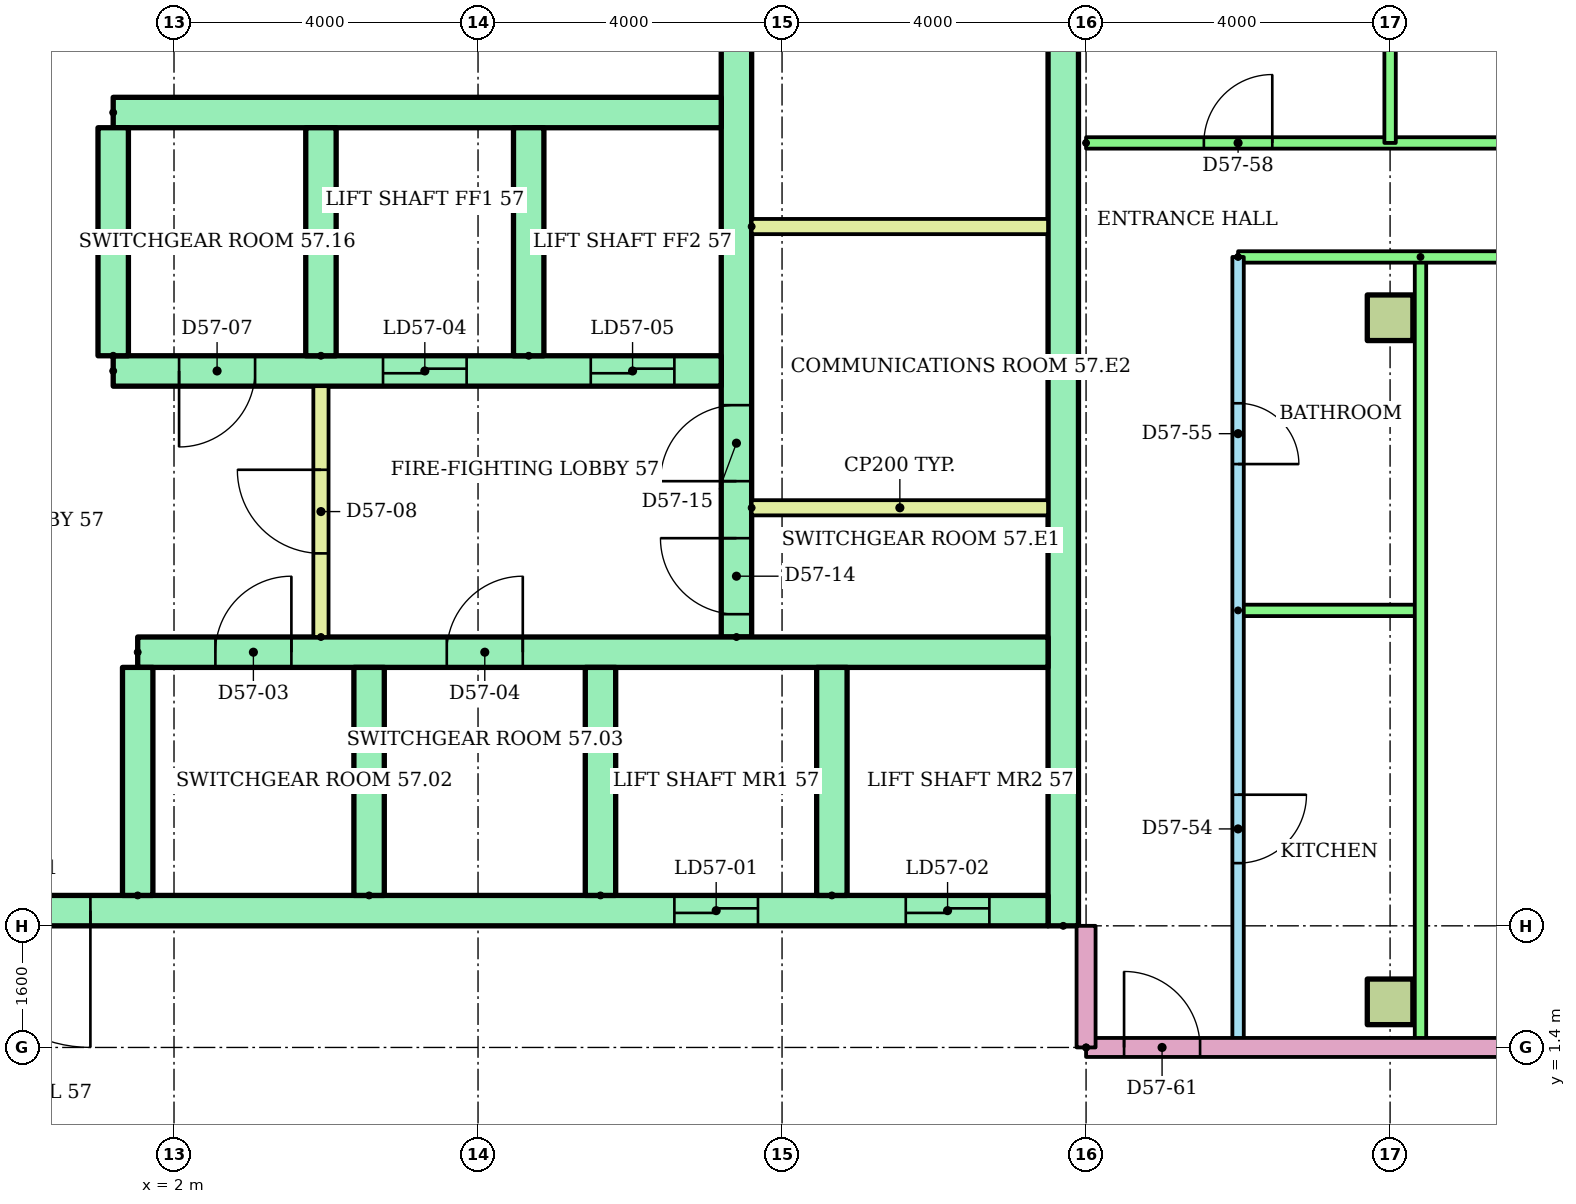
"""IFC4 building model, lengths in metres.
Left out: names, types, materials, properties, quantities, classifications, styles, units other than length and angle.
Written with IfcOpenShell. Run it as: python <this file> out.ifc"""

import sys

from ifc_helpers import new_model, si_unit, direction, frame, frame_2d, origin, origin_2d, place, context, subcontext, project, spatial, rectangle, extrude, element, fill, save


model = new_model("IFC4")
c1 = context("Model", 3, precision=1e-05, world=origin(), true_north=direction((0.0, 1.0)))
c2 = subcontext(c1, "Body", "Model", "MODEL_VIEW")
j1 = project(units=[si_unit("LENGTHUNIT", "METRE"), si_unit("PLANEANGLEUNIT", "RADIAN")], contexts=[c1])
p1 = place(None, origin())
s1 = spatial("IfcSite", under=j1, at=p1, CompositionType="ELEMENT")
p2 = place(p1, origin())
s2 = spatial("IfcBuilding", under=s1, at=p2, CompositionType="ELEMENT")
p3 = place(p2, frame((0.0, 0.0, 220.4)))
s3 = spatial("IfcBuildingStorey", under=s2, at=p3, CompositionType="ELEMENT", Elevation=220.4)
for number, where in (
    (1, (18.0, 2.0, 0.0)),
    (2, (18.0, 11.0, 0.0)),
):
    element("IfcColumn", number, at=place(p3, frame(where)), inside=s3, PredefinedType="COLUMN", context=c2, shape_type="SweptSolid", body=[
        extrude(rectangle(XDim=0.6, YDim=0.6, at=origin_2d()), origin(), (0.0, 0.0, 1.0), 3.2),
    ])
p4 = place(p3, frame((13.7, 3.0, 0.0), z_axis=(0.0, 0.0, 1.0), x_axis=(0.0, 1.0, 0.0)))
e3 = element("IfcWall", 3, at=p4, inside=s3, PredefinedType="SHEAR", context=c2, shape_type="SweptSolid", body=[
    extrude(rectangle(XDim=17.0, YDim=0.4, at=frame_2d((8.5, 0.0))), origin(), (0.0, 0.0, 1.0), 2.92),
])
p5 = place(p3, frame((9.4, 6.8, 0.0), z_axis=(0.0, 0.0, 1.0), x_axis=(0.0, 1.0, 0.0)))
e4 = element("IfcWall", 4, at=p5, inside=s3, PredefinedType="SHEAR", context=c2, shape_type="SweptSolid", body=[
    extrude(rectangle(XDim=12.7, YDim=0.4, at=frame_2d((6.35, 0.0))), origin(), (0.0, 0.0, 1.0), 2.92),
])
p6 = place(p5, frame((0.3, 0.0, 0.0)))
e5 = element("IfcOpeningElement", 5, at=p6, cuts=e4, PredefinedType="OPENING", context=c2, shape_type="SweptSolid", body=[
    extrude(rectangle(XDim=1.0, YDim=2.1, at=frame_2d((0.5, 1.05))), frame((0.0, 0.21, 0.0), z_axis=(0.0, -1.0, 0.0), x_axis=(1.0, 0.0, 0.0)), (0.0, 0.0, 1.0), 0.42),
])
p7 = place(p5, frame((2.05, 0.0, 0.0)))
e6 = element("IfcOpeningElement", 6, at=p7, cuts=e4, PredefinedType="OPENING", context=c2, shape_type="SweptSolid", body=[
    extrude(rectangle(XDim=1.0, YDim=2.1, at=frame_2d((0.5, 1.05))), frame((0.0, 0.21, 0.0), z_axis=(0.0, -1.0, 0.0), x_axis=(1.0, 0.0, 0.0)), (0.0, 0.0, 1.0), 0.42),
])
p8 = place(p5, frame((7.925, 0.0, 0.0)))
e7 = element("IfcOpeningElement", 7, at=p8, cuts=e4, PredefinedType="OPENING", context=c2, shape_type="SweptSolid", body=[
    extrude(rectangle(XDim=1.0, YDim=2.1, at=frame_2d((0.5, 1.05))), frame((0.0, 0.21, 0.0), z_axis=(0.0, -1.0, 0.0), x_axis=(1.0, 0.0, 0.0)), (0.0, 0.0, 1.0), 0.42),
])
p9 = place(p3, frame((-13.5, 3.2, 0.0)))
e8 = element("IfcWall", 8, at=p9, inside=s3, PredefinedType="SHEAR", context=c2, shape_type="SweptSolid", body=[
    extrude(rectangle(XDim=27.0, YDim=0.4, at=frame_2d((13.5, 0.0))), origin(), (0.0, 0.0, 1.0), 2.92),
])
p10 = place(p9, frame((22.083, 0.0, 0.0)))
e9 = element("IfcOpeningElement", 9, at=p10, cuts=e8, PredefinedType="OPENING", context=c2, shape_type="SweptSolid", body=[
    extrude(rectangle(XDim=1.1, YDim=2.1, at=frame_2d((0.55, 1.05))), frame((0.0, 0.21, 0.0), z_axis=(0.0, -1.0, 0.0), x_axis=(1.0, 0.0, 0.0)), (0.0, 0.0, 1.0), 0.42),
])
p11 = place(p9, frame((25.128, 0.0, 0.0)))
e10 = element("IfcOpeningElement", 10, at=p11, cuts=e8, PredefinedType="OPENING", context=c2, shape_type="SweptSolid", body=[
    extrude(rectangle(XDim=1.1, YDim=2.1, at=frame_2d((0.55, 1.05))), frame((0.0, 0.21, 0.0), z_axis=(0.0, -1.0, 0.0), x_axis=(1.0, 0.0, 0.0)), (0.0, 0.0, 1.0), 0.42),
])
p12 = place(p9, frame((12.6, 0.0, 0.0)))
e11 = element("IfcOpeningElement", 11, at=p12, cuts=e8, PredefinedType="OPENING", context=c2, shape_type="SweptSolid", body=[
    extrude(rectangle(XDim=1.8, YDim=2.1, at=frame_2d((0.9, 1.05))), frame((0.0, 0.21, 0.0), z_axis=(0.0, -1.0, 0.0), x_axis=(1.0, 0.0, 0.0)), (0.0, 0.0, 1.0), 0.42),
])
p13 = place(p3, frame((1.522, 6.6, 0.0)))
e12 = element("IfcWall", 12, at=p13, inside=s3, PredefinedType="SHEAR", context=c2, shape_type="SweptSolid", body=[
    extrude(rectangle(XDim=11.978, YDim=0.4, at=frame_2d((5.989, 0.0))), origin(), (0.0, 0.0, 1.0), 2.92),
])
p14 = place(p13, frame((1.022, 0.0, 0.0)))
e13 = element("IfcOpeningElement", 13, at=p14, cuts=e12, PredefinedType="OPENING", context=c2, shape_type="SweptSolid", body=[
    extrude(rectangle(XDim=1.0, YDim=2.1, at=frame_2d((0.5, 1.05))), frame((0.0, 0.21, 0.0), z_axis=(0.0, -1.0, 0.0), x_axis=(1.0, 0.0, 0.0)), (0.0, 0.0, 1.0), 0.42),
])
p15 = place(p13, frame((4.067, 0.0, 0.0)))
e14 = element("IfcOpeningElement", 14, at=p15, cuts=e12, PredefinedType="OPENING", context=c2, shape_type="SweptSolid", body=[
    extrude(rectangle(XDim=1.0, YDim=2.1, at=frame_2d((0.5, 1.05))), frame((0.0, 0.21, 0.0), z_axis=(0.0, -1.0, 0.0), x_axis=(1.0, 0.0, 0.0)), (0.0, 0.0, 1.0), 0.42),
])
for number, where, z_axis, x_axis in (
    (15, (1.522, 3.4, 0.0), (0.0, 0.0, 1.0), (0.0, 1.0, 0.0)),
    (16, (4.567, 3.4, 0.0), (0.0, 0.0, 1.0), (0.0, 1.0, 0.0)),
    (17, (7.611, 3.4, 0.0), (0.0, 0.0, 1.0), (0.0, 1.0, 0.0)),
    (18, (10.656, 3.4, 0.0), (0.0, 0.0, 1.0), (0.0, 1.0, 0.0)),
):
    element("IfcWall", number, at=place(p3, frame(where, z_axis=z_axis, x_axis=x_axis)), inside=s3, PredefinedType="SHEAR", context=c2, shape_type="SweptSolid", body=[
        extrude(rectangle(XDim=3.0, YDim=0.4, at=frame_2d((1.5, 0.0))), origin(), (0.0, 0.0, 1.0), 2.92),
    ])
p16 = place(p3, frame((1.2, 10.3, 0.0)))
e19 = element("IfcWall", 19, at=p16, inside=s3, PredefinedType="SHEAR", context=c2, shape_type="SweptSolid", body=[
    extrude(rectangle(XDim=8.0, YDim=0.4, at=frame_2d((4.0, 0.0))), origin(), (0.0, 0.0, 1.0), 2.92),
])
p17 = place(p16, frame((3.55, 0.0, 0.0)))
e20 = element("IfcOpeningElement", 20, at=p17, cuts=e19, PredefinedType="OPENING", context=c2, shape_type="SweptSolid", body=[
    extrude(rectangle(XDim=1.1, YDim=2.1, at=frame_2d((0.55, 1.05))), frame((0.0, 0.21, 0.0), z_axis=(0.0, -1.0, 0.0), x_axis=(1.0, 0.0, 0.0)), (0.0, 0.0, 1.0), 0.42),
])
p18 = place(p16, frame((6.283, 0.0, 0.0)))
e21 = element("IfcOpeningElement", 21, at=p18, cuts=e19, PredefinedType="OPENING", context=c2, shape_type="SweptSolid", body=[
    extrude(rectangle(XDim=1.1, YDim=2.1, at=frame_2d((0.55, 1.05))), frame((0.0, 0.21, 0.0), z_axis=(0.0, -1.0, 0.0), x_axis=(1.0, 0.0, 0.0)), (0.0, 0.0, 1.0), 0.42),
])
p19 = place(p16, frame((0.867, 0.0, 0.0)))
e22 = element("IfcOpeningElement", 22, at=p19, cuts=e19, PredefinedType="OPENING", context=c2, shape_type="SweptSolid", body=[
    extrude(rectangle(XDim=1.0, YDim=2.1, at=frame_2d((0.5, 1.05))), frame((0.0, 0.21, 0.0), z_axis=(0.0, -1.0, 0.0), x_axis=(1.0, 0.0, 0.0)), (0.0, 0.0, 1.0), 0.42),
])
p20 = place(p3, frame((1.2, 13.7, 0.0)))
e23 = element("IfcWall", 23, at=p20, inside=s3, PredefinedType="SHEAR", context=c2, shape_type="SweptSolid", body=[
    extrude(rectangle(XDim=8.0, YDim=0.4, at=frame_2d((4.0, 0.0))), origin(), (0.0, 0.0, 1.0), 2.92),
])
for number, where, z_axis, x_axis in (
    (24, (1.2, 10.5, 0.0), (0.0, 0.0, 1.0), (0.0, 1.0, 0.0)),
    (25, (3.933, 10.5, 0.0), (0.0, 0.0, 1.0), (0.0, 1.0, 0.0)),
    (26, (6.667, 10.5, 0.0), (0.0, 0.0, 1.0), (0.0, 1.0, 0.0)),
):
    element("IfcWall", number, at=place(p3, frame(where, z_axis=z_axis, x_axis=x_axis)), inside=s3, PredefinedType="SHEAR", context=c2, shape_type="SweptSolid", body=[
        extrude(rectangle(XDim=3.0, YDim=0.4, at=frame_2d((1.5, 0.0))), origin(), (0.0, 0.0, 1.0), 2.92),
    ])
p21 = place(p3, frame((3.933, 6.8, 0.0), z_axis=(0.0, 0.0, 1.0), x_axis=(0.0, 1.0, 0.0)))
e27 = element("IfcWall", 27, at=p21, inside=s3, PredefinedType="PARTITIONING", context=c2, shape_type="SweptSolid", body=[
    extrude(rectangle(XDim=3.3, YDim=0.2, at=frame_2d((1.65, 0.0))), origin(), (0.0, 0.0, 1.0), 2.92),
])
p22 = place(p21, frame((1.1, 0.0, 0.0)))
e28 = element("IfcOpeningElement", 28, at=p22, cuts=e27, PredefinedType="OPENING", context=c2, shape_type="SweptSolid", body=[
    extrude(rectangle(XDim=1.1, YDim=2.1, at=frame_2d((0.55, 1.05))), frame((0.0, 0.11, 0.0), z_axis=(0.0, -1.0, 0.0), x_axis=(1.0, 0.0, 0.0)), (0.0, 0.0, 1.0), 0.22),
])
for number, where in (
    (29, (9.6, 8.5, 0.0)),
    (30, (9.6, 12.2, 0.0)),
):
    element("IfcWall", number, at=place(p3, frame(where)), inside=s3, PredefinedType="PARTITIONING", context=c2, shape_type="SweptSolid", body=[
        extrude(rectangle(XDim=3.9, YDim=0.2, at=frame_2d((1.95, 0.0))), origin(), (0.0, 0.0, 1.0), 2.92),
    ])
p23 = place(p3, frame((16.0, 11.8, 0.0), z_axis=(0.0, 0.0, 1.0), x_axis=(0.0, -1.0, 0.0)))
e31 = element("IfcWall", 31, at=p23, inside=s3, PredefinedType="PARTITIONING", context=c2, shape_type="SweptSolid", body=[
    extrude(rectangle(XDim=10.4, YDim=0.15, at=frame_2d((5.2, 0.0))), origin(), (0.0, 0.0, 1.0), 2.4),
])
p24 = place(p23, frame((7.075, 0.0, 0.0)))
e32 = element("IfcOpeningElement", 32, at=p24, cuts=e31, PredefinedType="OPENING", context=c2, shape_type="SweptSolid", body=[
    extrude(rectangle(XDim=0.9, YDim=2.1, at=frame_2d((0.45, 1.05))), frame((0.0, 0.085, 0.0), z_axis=(0.0, -1.0, 0.0), x_axis=(1.0, 0.0, 0.0)), (0.0, 0.0, 1.0), 0.17),
])
p25 = place(p23, frame((1.925, 0.0, 0.0)))
e33 = element("IfcOpeningElement", 33, at=p25, cuts=e31, PredefinedType="OPENING", context=c2, shape_type="SweptSolid", body=[
    extrude(rectangle(XDim=0.8, YDim=2.1, at=frame_2d((0.4, 1.05))), frame((0.0, 0.085, 0.0), z_axis=(0.0, -1.0, 0.0), x_axis=(1.0, 0.0, 0.0)), (0.0, 0.0, 1.0), 0.17),
])
p26 = place(p3, frame((16.0, 7.15, 0.0)))
e34 = element("IfcWall", 34, at=p26, inside=s3, PredefinedType="PARTITIONING", context=c2, shape_type="SweptSolid", body=[
    extrude(rectangle(XDim=2.4, YDim=0.15, at=frame_2d((1.2, 0.0))), origin(), (0.0, 0.0, 1.0), 2.4),
])
p27 = place(p3, frame((18.4, 11.8, 0.0), z_axis=(0.0, 0.0, 1.0), x_axis=(0.0, -1.0, 0.0)))
e35 = element("IfcWall", 35, at=p27, inside=s3, PredefinedType="PARTITIONING", context=c2, shape_type="SweptSolid", body=[
    extrude(rectangle(XDim=10.4, YDim=0.15, at=frame_2d((5.2, 0.0))), origin(), (0.0, 0.0, 1.0), 2.4),
])
p28 = place(p3, frame((28.92, 11.8, 0.0), z_axis=(0.0, 0.0, 1.0), x_axis=(-1.0, 0.0, 0.0)))
e36 = element("IfcWall", 36, at=p28, inside=s3, PredefinedType="PARTITIONING", context=c2, shape_type="SweptSolid", body=[
    extrude(rectangle(XDim=12.92, YDim=0.15, at=frame_2d((6.46, 0.0))), origin(), (0.0, 0.0, 1.0), 2.4),
])
p29 = place(p28, frame((7.07, 0.0, 0.0)))
e37 = element("IfcOpeningElement", 37, at=p29, cuts=e36, PredefinedType="OPENING", context=c2, shape_type="SweptSolid", body=[
    extrude(rectangle(XDim=0.9, YDim=2.1, at=frame_2d((0.45, 1.05))), frame((0.0, 0.085, 0.0), z_axis=(0.0, -1.0, 0.0), x_axis=(1.0, 0.0, 0.0)), (0.0, 0.0, 1.0), 0.17),
])
p30 = place(p28, frame((1.544, 0.0, 0.0)))
e38 = element("IfcOpeningElement", 38, at=p30, cuts=e36, PredefinedType="OPENING", context=c2, shape_type="SweptSolid", body=[
    extrude(rectangle(XDim=0.9, YDim=2.1, at=frame_2d((0.45, 1.05))), frame((0.0, 0.085, 0.0), z_axis=(0.0, -1.0, 0.0), x_axis=(1.0, 0.0, 0.0)), (0.0, 0.0, 1.0), 0.17),
])
p31 = place(p3, frame((14.0, 13.3, 0.0)))
e39 = element("IfcWall", 39, at=p31, inside=s3, PredefinedType="PARTITIONING", context=c2, shape_type="SweptSolid", body=[
    extrude(rectangle(XDim=14.92, YDim=0.15, at=frame_2d((7.46, 0.0))), origin(), (0.0, 0.0, 1.0), 2.4),
])
p32 = place(p31, frame((1.55, 0.0, 0.0)))
e40 = element("IfcOpeningElement", 40, at=p32, cuts=e39, PredefinedType="OPENING", context=c2, shape_type="SweptSolid", body=[
    extrude(rectangle(XDim=0.9, YDim=2.1, at=frame_2d((0.45, 1.05))), frame((0.0, 0.085, 0.0), z_axis=(0.0, -1.0, 0.0), x_axis=(1.0, 0.0, 0.0)), (0.0, 0.0, 1.0), 0.17),
])
p33 = place(p31, frame((6.6, 0.0, 0.0)))
e41 = element("IfcOpeningElement", 41, at=p33, cuts=e39, PredefinedType="OPENING", context=c2, shape_type="SweptSolid", body=[
    extrude(rectangle(XDim=1.0, YDim=2.1, at=frame_2d((0.5, 1.05))), frame((0.0, 0.085, 0.0), z_axis=(0.0, -1.0, 0.0), x_axis=(1.0, 0.0, 0.0)), (0.0, 0.0, 1.0), 0.17),
])
p34 = place(p31, frame((12.0, 0.0, 0.0)))
e42 = element("IfcOpeningElement", 42, at=p34, cuts=e39, PredefinedType="OPENING", context=c2, shape_type="SweptSolid", body=[
    extrude(rectangle(XDim=0.9, YDim=2.1, at=frame_2d((0.45, 1.05))), frame((0.0, 0.085, 0.0), z_axis=(0.0, -1.0, 0.0), x_axis=(1.0, 0.0, 0.0)), (0.0, 0.0, 1.0), 0.17),
])
p35 = place(p3, frame((18.0, 18.921, 0.0), z_axis=(0.0, 0.0, 1.0), x_axis=(0.0, -1.0, 0.0)))
e43 = element("IfcWall", 43, at=p35, inside=s3, PredefinedType="PARTITIONING", context=c2, shape_type="SweptSolid", body=[
    extrude(rectangle(XDim=5.621, YDim=0.15, at=frame_2d((2.811, 0.0))), origin(), (0.0, 0.0, 1.0), 2.4),
])
p36 = place(p3, frame((14.0, 1.4, 0.0)))
e44 = element("IfcWall", 44, at=p36, inside=s3, PredefinedType="PARTITIONING", context=c2, shape_type="SweptSolid", body=[
    extrude(rectangle(XDim=14.92, YDim=0.25, at=frame_2d((7.46, 0.0))), origin(), (0.0, 0.0, 1.0), 2.4),
])
p37 = place(p36, frame((0.5, 0.0, 0.0)))
e45 = element("IfcOpeningElement", 45, at=p37, cuts=e44, PredefinedType="OPENING", context=c2, shape_type="SweptSolid", body=[
    extrude(rectangle(XDim=1.0, YDim=2.1, at=frame_2d((0.5, 1.05))), frame((0.0, 0.135, 0.0), z_axis=(0.0, -1.0, 0.0), x_axis=(1.0, 0.0, 0.0)), (0.0, 0.0, 1.0), 0.27),
])
p38 = place(p3, frame((14.0, 1.4, 0.0), z_axis=(0.0, 0.0, 1.0), x_axis=(0.0, 1.0, 0.0)))
e46 = element("IfcWall", 46, at=p38, inside=s3, PredefinedType="PARTITIONING", context=c2, shape_type="SweptSolid", body=[
    extrude(rectangle(XDim=1.6, YDim=0.25, at=frame_2d((0.8, 0.0))), origin(), (0.0, 0.0, 1.0), 2.4),
])
p39 = place(p10, origin())
e47 = element("IfcDoor", 47, at=p39, inside=s3, OperationType="SLIDING_TO_LEFT", PredefinedType="DOOR", context=c2, shape_type="SweptSolid", body=[
    extrude(rectangle(XDim=1.1, YDim=2.1, at=frame_2d((0.55, 1.05))), frame((0.0, 0.025, 0.0), z_axis=(0.0, -1.0, 0.0), x_axis=(1.0, 0.0, 0.0)), (0.0, 0.0, 1.0), 0.05),
])
fill(e9, e47)
p40 = place(p11, origin())
e48 = element("IfcDoor", 48, at=p40, inside=s3, OperationType="SLIDING_TO_LEFT", PredefinedType="DOOR", context=c2, shape_type="SweptSolid", body=[
    extrude(rectangle(XDim=1.1, YDim=2.1, at=frame_2d((0.55, 1.05))), frame((0.0, 0.025, 0.0), z_axis=(0.0, -1.0, 0.0), x_axis=(1.0, 0.0, 0.0)), (0.0, 0.0, 1.0), 0.05),
])
fill(e10, e48)
p41 = place(p12, frame((1.8, 0.0, 0.0), z_axis=(0.0, 0.0, 1.0), x_axis=(-1.0, 0.0, 0.0)))
e49 = element("IfcDoor", 49, at=p41, inside=s3, OperationType="DOUBLE_DOOR_SINGLE_SWING", PredefinedType="DOOR", context=c2, shape_type="SweptSolid", body=[
    extrude(rectangle(XDim=1.8, YDim=2.1, at=frame_2d((0.9, 1.05))), frame((0.0, 0.025, 0.0), z_axis=(0.0, -1.0, 0.0), x_axis=(1.0, 0.0, 0.0)), (0.0, 0.0, 1.0), 0.05),
])
fill(e11, e49)
p42 = place(p14, origin())
e50 = element("IfcDoor", 50, at=p42, inside=s3, OperationType="SINGLE_SWING_RIGHT", PredefinedType="DOOR", context=c2, shape_type="SweptSolid", body=[
    extrude(rectangle(XDim=1.0, YDim=2.1, at=frame_2d((0.5, 1.05))), frame((0.0, 0.025, 0.0), z_axis=(0.0, -1.0, 0.0), x_axis=(1.0, 0.0, 0.0)), (0.0, 0.0, 1.0), 0.05),
])
fill(e13, e50)
p43 = place(p15, origin())
e51 = element("IfcDoor", 51, at=p43, inside=s3, OperationType="SINGLE_SWING_RIGHT", PredefinedType="DOOR", context=c2, shape_type="SweptSolid", body=[
    extrude(rectangle(XDim=1.0, YDim=2.1, at=frame_2d((0.5, 1.05))), frame((0.0, 0.025, 0.0), z_axis=(0.0, -1.0, 0.0), x_axis=(1.0, 0.0, 0.0)), (0.0, 0.0, 1.0), 0.05),
])
fill(e14, e51)
p44 = place(p17, origin())
e52 = element("IfcDoor", 52, at=p44, inside=s3, OperationType="SLIDING_TO_LEFT", PredefinedType="DOOR", context=c2, shape_type="SweptSolid", body=[
    extrude(rectangle(XDim=1.1, YDim=2.1, at=frame_2d((0.55, 1.05))), frame((0.0, 0.025, 0.0), z_axis=(0.0, -1.0, 0.0), x_axis=(1.0, 0.0, 0.0)), (0.0, 0.0, 1.0), 0.05),
])
fill(e20, e52)
p45 = place(p18, origin())
e53 = element("IfcDoor", 53, at=p45, inside=s3, OperationType="SLIDING_TO_LEFT", PredefinedType="DOOR", context=c2, shape_type="SweptSolid", body=[
    extrude(rectangle(XDim=1.1, YDim=2.1, at=frame_2d((0.55, 1.05))), frame((0.0, 0.025, 0.0), z_axis=(0.0, -1.0, 0.0), x_axis=(1.0, 0.0, 0.0)), (0.0, 0.0, 1.0), 0.05),
])
fill(e21, e53)
p46 = place(p19, frame((1.0, 0.0, 0.0), z_axis=(0.0, 0.0, 1.0), x_axis=(-1.0, 0.0, 0.0)))
e54 = element("IfcDoor", 54, at=p46, inside=s3, OperationType="SINGLE_SWING_LEFT", PredefinedType="DOOR", context=c2, shape_type="SweptSolid", body=[
    extrude(rectangle(XDim=1.0, YDim=2.1, at=frame_2d((0.5, 1.05))), frame((0.0, 0.025, 0.0), z_axis=(0.0, -1.0, 0.0), x_axis=(1.0, 0.0, 0.0)), (0.0, 0.0, 1.0), 0.05),
])
fill(e22, e54)
p47 = place(p22, origin())
e55 = element("IfcDoor", 55, at=p47, inside=s3, OperationType="SINGLE_SWING_RIGHT", PredefinedType="DOOR", context=c2, shape_type="SweptSolid", body=[
    extrude(rectangle(XDim=1.1, YDim=2.1, at=frame_2d((0.55, 1.05))), frame((0.0, 0.025, 0.0), z_axis=(0.0, -1.0, 0.0), x_axis=(1.0, 0.0, 0.0)), (0.0, 0.0, 1.0), 0.05),
])
fill(e28, e55)
p48 = place(p6, origin())
e56 = element("IfcDoor", 56, at=p48, inside=s3, OperationType="SINGLE_SWING_RIGHT", PredefinedType="DOOR", context=c2, shape_type="SweptSolid", body=[
    extrude(rectangle(XDim=1.0, YDim=2.1, at=frame_2d((0.5, 1.05))), frame((0.0, 0.025, 0.0), z_axis=(0.0, -1.0, 0.0), x_axis=(1.0, 0.0, 0.0)), (0.0, 0.0, 1.0), 0.05),
])
fill(e5, e56)
p49 = place(p7, origin())
e57 = element("IfcDoor", 57, at=p49, inside=s3, OperationType="SINGLE_SWING_LEFT", PredefinedType="DOOR", context=c2, shape_type="SweptSolid", body=[
    extrude(rectangle(XDim=1.0, YDim=2.1, at=frame_2d((0.5, 1.05))), frame((0.0, 0.025, 0.0), z_axis=(0.0, -1.0, 0.0), x_axis=(1.0, 0.0, 0.0)), (0.0, 0.0, 1.0), 0.05),
])
fill(e6, e57)
p50 = place(p24, origin())
e58 = element("IfcDoor", 58, at=p50, inside=s3, OperationType="SINGLE_SWING_LEFT", PredefinedType="DOOR", context=c2, shape_type="SweptSolid", body=[
    extrude(rectangle(XDim=0.9, YDim=2.1, at=frame_2d((0.45, 1.05))), frame((0.0, 0.025, 0.0), z_axis=(0.0, -1.0, 0.0), x_axis=(1.0, 0.0, 0.0)), (0.0, 0.0, 1.0), 0.05),
])
fill(e32, e58)
p51 = place(p25, origin())
e59 = element("IfcDoor", 59, at=p51, inside=s3, OperationType="SINGLE_SWING_RIGHT", PredefinedType="DOOR", context=c2, shape_type="SweptSolid", body=[
    extrude(rectangle(XDim=0.8, YDim=2.1, at=frame_2d((0.4, 1.05))), frame((0.0, 0.025, 0.0), z_axis=(0.0, -1.0, 0.0), x_axis=(1.0, 0.0, 0.0)), (0.0, 0.0, 1.0), 0.05),
])
fill(e33, e59)
p52 = place(p32, origin())
e60 = element("IfcDoor", 60, at=p52, inside=s3, OperationType="SINGLE_SWING_RIGHT", PredefinedType="DOOR", context=c2, shape_type="SweptSolid", body=[
    extrude(rectangle(XDim=0.9, YDim=2.1, at=frame_2d((0.45, 1.05))), frame((0.0, 0.025, 0.0), z_axis=(0.0, -1.0, 0.0), x_axis=(1.0, 0.0, 0.0)), (0.0, 0.0, 1.0), 0.05),
])
fill(e40, e60)
p53 = place(p37, origin())
e61 = element("IfcDoor", 61, at=p53, inside=s3, OperationType="SINGLE_SWING_LEFT", PredefinedType="DOOR", context=c2, shape_type="SweptSolid", body=[
    extrude(rectangle(XDim=1.0, YDim=2.1, at=frame_2d((0.5, 1.05))), frame((0.0, 0.025, 0.0), z_axis=(0.0, -1.0, 0.0), x_axis=(1.0, 0.0, 0.0)), (0.0, 0.0, 1.0), 0.05),
])
fill(e45, e61)
save(model, sys.argv[1])
